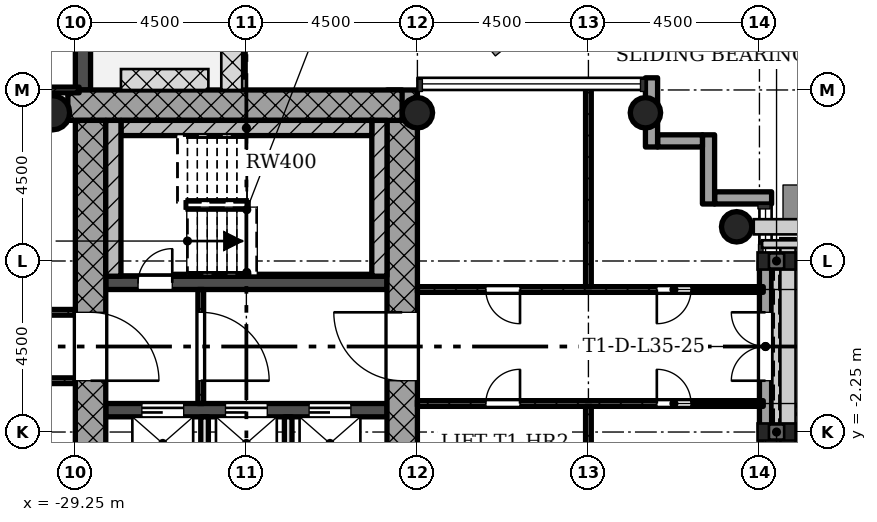
"""IFC4 building model, lengths in metres.
Left out: names, types, materials, properties, quantities, classifications, styles, units other than length and angle.
Written with IfcOpenShell. Run it as: python <this file> out.ifc"""

import sys

from ifc_helpers import new_model, si_unit, direction, frame, frame_2d, origin, origin_2d, place, context, subcontext, project, spatial, rectangle, hollow_circle, extrude, element, fill, save


model = new_model("IFC4")
c1 = context("Model", 3, precision=1e-05, world=origin(), true_north=direction((0.0, 1.0)))
c2 = subcontext(c1, "Body", "Model", "MODEL_VIEW")
j1 = project(units=[si_unit("LENGTHUNIT", "METRE"), si_unit("PLANEANGLEUNIT", "RADIAN")], contexts=[c1])
p1 = place(None, origin())
s1 = spatial("IfcSite", under=j1, at=p1, CompositionType="ELEMENT")
p2 = place(p1, origin())
s2 = spatial("IfcBuilding", under=s1, at=p2, CompositionType="ELEMENT")
p3 = place(p2, frame((0.0, 0.0, 128.7)))
s3 = spatial("IfcBuildingStorey", under=s2, at=p3, CompositionType="ELEMENT", Elevation=128.7)
p4 = place(p3, frame((-20.65, -5.95, 0.0), z_axis=(0.0, 0.0, 1.0), x_axis=(0.0, 1.0, 0.0)))
e1 = element("IfcWall", 1, at=p4, inside=s3, PredefinedType="SHEAR", context=c2, shape_type="SweptSolid", body=[
    extrude(rectangle(XDim=12.7, YDim=0.8, at=frame_2d((6.35, 0.0))), origin(), (0.0, 0.0, 1.0), 5.0),
])
p5 = place(p4, frame((5.05, 0.0, 0.0)))
e2 = element("IfcOpeningElement", 2, at=p5, cuts=e1, PredefinedType="OPENING", context=c2, shape_type="SweptSolid", body=[
    extrude(rectangle(XDim=1.8, YDim=2.1, at=frame_2d((0.9, 1.05))), frame((0.0, 0.41, 0.0), z_axis=(0.0, -1.0, 0.0), x_axis=(1.0, 0.0, 0.0)), (0.0, 0.0, 1.0), 0.82),
])
p6 = place(p3, frame((-20.652, 6.35, 0.0), z_axis=(0.0, 0.0, 1.0), x_axis=(-1.0, 0.0, 0.0)))
e3 = element("IfcWall", 3, at=p6, inside=s3, PredefinedType="SHEAR", context=c2, shape_type="SweptSolid", body=[
    extrude(rectangle(XDim=8.796, YDim=0.8, at=frame_2d((4.398, 0.0))), origin(), (0.0, 0.0, 1.0), 5.0),
])
p7 = place(p3, frame((-28.85, 5.95, 0.0), z_axis=(0.0, 0.0, 1.0), x_axis=(0.0, -1.0, 0.0)))
e4 = element("IfcWall", 4, at=p7, inside=s3, PredefinedType="SHEAR", context=c2, shape_type="SweptSolid", body=[
    extrude(rectangle(XDim=12.7, YDim=0.8, at=frame_2d((6.35, 0.0))), origin(), (0.0, 0.0, 1.0), 5.0),
])
p8 = place(p7, frame((5.05, 0.0, 0.0)))
e5 = element("IfcOpeningElement", 5, at=p8, cuts=e4, PredefinedType="OPENING", context=c2, shape_type="SweptSolid", body=[
    extrude(rectangle(XDim=1.8, YDim=2.1, at=frame_2d((0.9, 1.05))), frame((0.0, 0.41, 0.0), z_axis=(0.0, -1.0, 0.0), x_axis=(1.0, 0.0, 0.0)), (0.0, 0.0, 1.0), 0.82),
])
p9 = place(p3, frame((-28.45, -1.675, 0.0), z_axis=(0.0, 0.0, 1.0), x_axis=(1.0, 0.0, 0.0)))
e6 = element("IfcWall", 6, at=p9, inside=s3, PredefinedType="SHEAR", context=c2, shape_type="SweptSolid", body=[
    extrude(rectangle(XDim=7.4, YDim=0.35, at=frame_2d((3.7, 0.0))), origin(), (0.0, 0.0, 1.0), 5.0),
])
p10 = place(p9, frame((0.95, 0.0, 0.0)))
e7 = element("IfcOpeningElement", 7, at=p10, cuts=e6, PredefinedType="OPENING", context=c2, shape_type="SweptSolid", body=[
    extrude(rectangle(XDim=1.1, YDim=2.1, at=frame_2d((0.55, 1.05))), frame((0.0, 0.185, 0.0), z_axis=(0.0, -1.0, 0.0), x_axis=(1.0, 0.0, 0.0)), (0.0, 0.0, 1.0), 0.37),
])
p11 = place(p9, frame((3.15, 0.0, 0.0)))
e8 = element("IfcOpeningElement", 8, at=p11, cuts=e6, PredefinedType="OPENING", context=c2, shape_type="SweptSolid", body=[
    extrude(rectangle(XDim=1.1, YDim=2.1, at=frame_2d((0.55, 1.05))), frame((0.0, 0.185, 0.0), z_axis=(0.0, -1.0, 0.0), x_axis=(1.0, 0.0, 0.0)), (0.0, 0.0, 1.0), 0.37),
])
p12 = place(p9, frame((5.35, 0.0, 0.0)))
e9 = element("IfcOpeningElement", 9, at=p12, cuts=e6, PredefinedType="OPENING", context=c2, shape_type="SweptSolid", body=[
    extrude(rectangle(XDim=1.1, YDim=2.1, at=frame_2d((0.55, 1.05))), frame((0.0, 0.185, 0.0), z_axis=(0.0, -1.0, 0.0), x_axis=(1.0, 0.0, 0.0)), (0.0, 0.0, 1.0), 0.37),
])
p13 = place(p3, frame((-28.45, 1.675, 0.0), z_axis=(0.0, 0.0, 1.0), x_axis=(1.0, 0.0, 0.0)))
e10 = element("IfcWall", 10, at=p13, inside=s3, PredefinedType="SHEAR", context=c2, shape_type="SweptSolid", body=[
    extrude(rectangle(XDim=7.4, YDim=0.35, at=frame_2d((3.7, 0.0))), origin(), (0.0, 0.0, 1.0), 5.0),
])
p14 = place(p13, frame((0.85, 0.0, 0.0)))
e11 = element("IfcOpeningElement", 11, at=p14, cuts=e10, PredefinedType="OPENING", context=c2, shape_type="SweptSolid", body=[
    extrude(rectangle(XDim=0.9, YDim=2.1, at=frame_2d((0.45, 1.05))), frame((0.0, 0.185, 0.0), z_axis=(0.0, -1.0, 0.0), x_axis=(1.0, 0.0, 0.0)), (0.0, 0.0, 1.0), 0.37),
])
for number, where, z_axis, x_axis in (
    (12, (-20.25, 6.15, 0.0), (0.0, 0.0, 1.0), (1.0, 0.0, 0.0)),
    (13, (-14.25, 6.15, 0.0), (0.0, 0.0, 1.0), (1.0, 0.0, 0.0)),
    (14, (-11.85, 3.15, 0.0), (0.0, 0.0, 1.0), (1.0, 0.0, 0.0)),
):
    element("IfcColumn", number, at=place(p3, frame(where, z_axis=z_axis, x_axis=x_axis)), inside=s3, PredefinedType="COLUMN", context=c2, shape_type="SweptSolid", body=[
        extrude(hollow_circle(Radius=0.4, WallThickness=0.028, at=origin_2d()), origin(), (0.0, 0.0, 1.0), 5.0),
    ])
p15 = place(p3, frame((-29.85, 6.15, 0.0), z_axis=(0.0, 0.0, 1.0), x_axis=(1.0, 0.0, 0.0)))
e15 = element("IfcColumn", 15, at=p15, inside=s3, PredefinedType="COLUMN", context=c2, shape_type="SweptSolid", body=[
    extrude(hollow_circle(Radius=0.45, WallThickness=0.032, at=origin_2d()), origin(), (0.0, 0.0, 1.0), 5.0),
])
p16 = place(p3, frame((-11.09, -2.25, 0.0), z_axis=(0.0, 0.0, 1.0), x_axis=(0.0, 1.0, 0.0)))
e16 = element("IfcWall", 16, at=p16, inside=s3, PredefinedType="STANDARD", context=c2, shape_type="SweptSolid", body=[
    extrude(rectangle(XDim=4.5, YDim=0.32, at=frame_2d((2.25, 0.0))), origin(), (0.0, 0.0, 1.0), 4.7),
])
p17 = place(p16, frame((1.35, 0.0, 0.0)))
e17 = element("IfcOpeningElement", 17, at=p17, cuts=e16, PredefinedType="OPENING", context=c2, shape_type="SweptSolid", body=[
    extrude(rectangle(XDim=1.8, YDim=2.1, at=frame_2d((0.9, 1.05))), frame((0.0, 0.17, 0.0), z_axis=(0.0, -1.0, 0.0), x_axis=(1.0, 0.0, 0.0)), (0.0, 0.0, 1.0), 0.34),
])
p18 = place(p3, frame((-10.93, 3.91, -0.3), z_axis=(0.0, 0.0, 1.0), x_axis=(-1.0, 0.0, 0.0)))
e18 = element("IfcWall", 18, at=p18, inside=s3, PredefinedType="STANDARD", context=c2, shape_type="SweptSolid", body=[
    extrude(rectangle(XDim=1.5, YDim=0.32, at=frame_2d((0.75, 0.0))), origin(), (0.0, 0.0, 1.0), 5.0),
])
p19 = place(p3, frame((-12.59, 3.75, -0.3), z_axis=(0.0, 0.0, 1.0), x_axis=(0.0, 1.0, 0.0)))
e19 = element("IfcWall", 19, at=p19, inside=s3, PredefinedType="STANDARD", context=c2, shape_type="SweptSolid", body=[
    extrude(rectangle(XDim=1.82, YDim=0.32, at=frame_2d((0.91, 0.0))), origin(), (0.0, 0.0, 1.0), 5.0),
])
p20 = place(p3, frame((-12.75, 5.41, -0.3), z_axis=(0.0, 0.0, 1.0), x_axis=(-1.0, 0.0, 0.0)))
e20 = element("IfcWall", 20, at=p20, inside=s3, PredefinedType="STANDARD", context=c2, shape_type="SweptSolid", body=[
    extrude(rectangle(XDim=1.18, YDim=0.32, at=frame_2d((0.59, 0.0))), origin(), (0.0, 0.0, 1.0), 5.0),
])
p21 = place(p3, frame((-14.09, 5.25, -0.3), z_axis=(0.0, 0.0, 1.0), x_axis=(0.0, 1.0, 0.0)))
e21 = element("IfcWall", 21, at=p21, inside=s3, PredefinedType="STANDARD", context=c2, shape_type="SweptSolid", body=[
    extrude(rectangle(XDim=1.82, YDim=0.32, at=frame_2d((0.91, 0.0))), origin(), (0.0, 0.0, 1.0), 5.0),
])
p22 = place(p3, frame((-29.05, 6.75, -0.02), z_axis=(0.0, 0.0, 1.0), x_axis=(0.0, 1.0, 0.0)))
e22 = element("IfcWall", 22, at=p22, inside=s3, PredefinedType="STANDARD", context=c2, shape_type="SweptSolid", body=[
    extrude(rectangle(XDim=4.5, YDim=0.4, at=frame_2d((2.25, 0.0))), origin(), (0.0, 0.0, 1.0), 4.72),
])
p23 = place(p22, frame((1.35, 0.0, 0.02)))
e23 = element("IfcOpeningElement", 23, at=p23, cuts=e22, PredefinedType="OPENING", context=c2, shape_type="SweptSolid", body=[
    extrude(rectangle(XDim=1.8, YDim=2.1, at=frame_2d((0.9, 1.05))), frame((0.0, 0.21, 0.0), z_axis=(0.0, -1.0, 0.0), x_axis=(1.0, 0.0, 0.0)), (0.0, 0.0, 1.0), 0.42),
])
p24 = place(p3, frame((-25.95, -1.5, 0.0), z_axis=(0.0, 0.0, 1.0), x_axis=(0.0, 1.0, 0.0)))
e24 = element("IfcWall", 24, at=p24, inside=s3, PredefinedType="PARTITIONING", context=c2, shape_type="SweptSolid", body=[
    extrude(rectangle(XDim=3.0, YDim=0.15, at=frame_2d((1.5, 0.0))), origin(), (0.0, 0.0, 1.0), 4.58),
])
p25 = place(p24, frame((0.6, 0.0, 0.0)))
e25 = element("IfcOpeningElement", 25, at=p25, cuts=e24, PredefinedType="OPENING", context=c2, shape_type="SweptSolid", body=[
    extrude(rectangle(XDim=1.8, YDim=2.1, at=frame_2d((0.9, 1.05))), frame((0.0, 0.085, 0.0), z_axis=(0.0, -1.0, 0.0), x_axis=(1.0, 0.0, 0.0)), (0.0, 0.0, 1.0), 0.17),
])
for number, where, z_axis, x_axis in (
    (26, (-25.85, -5.95, 0.0), (0.0, 0.0, 1.0), (0.0, 1.0, 0.0)),
    (27, (-23.65, -5.95, 0.0), (0.0, 0.0, 1.0), (0.0, 1.0, 0.0)),
):
    element("IfcWall", number, at=place(p3, frame(where, z_axis=z_axis, x_axis=x_axis)), inside=s3, PredefinedType="SOLIDWALL", context=c2, shape_type="SweptSolid", body=[
        extrude(rectangle(XDim=4.1, YDim=0.2, at=frame_2d((2.05, 0.0))), origin(), (0.0, 0.0, 1.0), 4.58),
    ])
p26 = place(p3, frame((-35.1, 0.9, 0.0), z_axis=(0.0, 0.0, 1.0), x_axis=(1.0, 0.0, 0.0)))
e28 = element("IfcWall", 28, at=p26, inside=s3, PredefinedType="PARTITIONING", context=c2, shape_type="SweptSolid", body=[
    extrude(rectangle(XDim=5.85, YDim=0.15, at=frame_2d((2.925, 0.0))), origin(), (0.0, 0.0, 1.0), 4.58),
])
p27 = place(p26, frame((2.475, 0.0, 0.0)))
e29 = element("IfcOpeningElement", 29, at=p27, cuts=e28, PredefinedType="OPENING", context=c2, shape_type="SweptSolid", body=[
    extrude(rectangle(XDim=0.9, YDim=2.1, at=frame_2d((0.45, 1.05))), frame((0.0, 0.085, 0.0), z_axis=(0.0, -1.0, 0.0), x_axis=(1.0, 0.0, 0.0)), (0.0, 0.0, 1.0), 0.17),
])
p28 = place(p3, frame((-35.1, -0.9, 0.0), z_axis=(0.0, 0.0, 1.0), x_axis=(1.0, 0.0, 0.0)))
e30 = element("IfcWall", 30, at=p28, inside=s3, PredefinedType="PARTITIONING", context=c2, shape_type="SweptSolid", body=[
    extrude(rectangle(XDim=5.85, YDim=0.15, at=frame_2d((2.925, 0.0))), origin(), (0.0, 0.0, 1.0), 4.58),
])
p29 = place(p28, frame((2.475, 0.0, 0.0)))
e31 = element("IfcOpeningElement", 31, at=p29, cuts=e30, PredefinedType="OPENING", context=c2, shape_type="SweptSolid", body=[
    extrude(rectangle(XDim=0.9, YDim=2.1, at=frame_2d((0.45, 1.05))), frame((0.0, 0.085, 0.0), z_axis=(0.0, -1.0, 0.0), x_axis=(1.0, 0.0, 0.0)), (0.0, 0.0, 1.0), 0.17),
])
p30 = place(p3, frame((-20.25, 1.5, 0.0), z_axis=(0.0, 0.0, 1.0), x_axis=(1.0, 0.0, 0.0)))
e32 = element("IfcWall", 32, at=p30, inside=s3, PredefinedType="PARTITIONING", context=c2, shape_type="SweptSolid", body=[
    extrude(rectangle(XDim=9.1, YDim=0.15, at=frame_2d((4.55, 0.0))), origin(), (0.0, 0.0, 1.0), 4.58),
])
p31 = place(p30, frame((1.8, 0.0, 0.0)))
e33 = element("IfcOpeningElement", 33, at=p31, cuts=e32, PredefinedType="OPENING", context=c2, shape_type="SweptSolid", body=[
    extrude(rectangle(XDim=0.9, YDim=2.1, at=frame_2d((0.45, 1.05))), frame((0.0, 0.085, 0.0), z_axis=(0.0, -1.0, 0.0), x_axis=(1.0, 0.0, 0.0)), (0.0, 0.0, 1.0), 0.17),
])
p32 = place(p30, frame((6.3, 0.0, 0.0)))
e34 = element("IfcOpeningElement", 34, at=p32, cuts=e32, PredefinedType="OPENING", context=c2, shape_type="SweptSolid", body=[
    extrude(rectangle(XDim=0.9, YDim=2.1, at=frame_2d((0.45, 1.05))), frame((0.0, 0.085, 0.0), z_axis=(0.0, -1.0, 0.0), x_axis=(1.0, 0.0, 0.0)), (0.0, 0.0, 1.0), 0.17),
])
p33 = place(p3, frame((-15.75, 1.575, 0.0), z_axis=(0.0, 0.0, 1.0), x_axis=(0.0, 1.0, 0.0)))
e35 = element("IfcWall", 35, at=p33, inside=s3, PredefinedType="PARTITIONING", context=c2, shape_type="SweptSolid", body=[
    extrude(rectangle(XDim=5.275, YDim=0.15, at=frame_2d((2.638, 0.0))), origin(), (0.0, 0.0, 1.0), 4.58),
])
p34 = place(p3, frame((-20.25, -1.5, 0.0), z_axis=(0.0, 0.0, 1.0), x_axis=(1.0, 0.0, 0.0)))
e36 = element("IfcWall", 36, at=p34, inside=s3, PredefinedType="PARTITIONING", context=c2, shape_type="SweptSolid", body=[
    extrude(rectangle(XDim=9.1, YDim=0.15, at=frame_2d((4.55, 0.0))), origin(), (0.0, 0.0, 1.0), 4.58),
])
p35 = place(p34, frame((1.8, 0.0, 0.0)))
e37 = element("IfcOpeningElement", 37, at=p35, cuts=e36, PredefinedType="OPENING", context=c2, shape_type="SweptSolid", body=[
    extrude(rectangle(XDim=0.9, YDim=2.1, at=frame_2d((0.45, 1.05))), frame((0.0, 0.085, 0.0), z_axis=(0.0, -1.0, 0.0), x_axis=(1.0, 0.0, 0.0)), (0.0, 0.0, 1.0), 0.17),
])
p36 = place(p34, frame((6.3, 0.0, 0.0)))
e38 = element("IfcOpeningElement", 38, at=p36, cuts=e36, PredefinedType="OPENING", context=c2, shape_type="SweptSolid", body=[
    extrude(rectangle(XDim=0.9, YDim=2.1, at=frame_2d((0.45, 1.05))), frame((0.0, 0.085, 0.0), z_axis=(0.0, -1.0, 0.0), x_axis=(1.0, 0.0, 0.0)), (0.0, 0.0, 1.0), 0.17),
])
p37 = place(p3, frame((-15.75, -1.575, 0.0), z_axis=(0.0, 0.0, 1.0), x_axis=(0.0, -1.0, 0.0)))
e39 = element("IfcWall", 39, at=p37, inside=s3, PredefinedType="PARTITIONING", context=c2, shape_type="SweptSolid", body=[
    extrude(rectangle(XDim=5.275, YDim=0.15, at=frame_2d((2.638, 0.0))), origin(), (0.0, 0.0, 1.0), 4.58),
])
p38 = place(p3, frame((-42.85, 6.75, 0.0), z_axis=(0.0, 0.0, 1.0), x_axis=(1.0, 0.0, 0.0)))
e40 = element("IfcWall", 40, at=p38, inside=s3, PredefinedType="PARTITIONING", context=c2, shape_type="SweptSolid", body=[
    extrude(rectangle(XDim=13.7, YDim=0.15, at=frame_2d((6.85, 0.0))), origin(), (0.0, 0.0, 1.0), 4.58),
])
p39 = place(p38, frame((5.95, 0.0, 0.0)))
e41 = element("IfcOpeningElement", 41, at=p39, cuts=e40, PredefinedType="OPENING", context=c2, shape_type="SweptSolid", body=[
    extrude(rectangle(XDim=1.8, YDim=2.1, at=frame_2d((0.9, 1.05))), frame((0.0, 0.085, 0.0), z_axis=(0.0, -1.0, 0.0), x_axis=(1.0, 0.0, 0.0)), (0.0, 0.0, 1.0), 0.17),
])
p40 = place(p3, frame((-21.25, 1.85, 0.0), z_axis=(0.0, 0.0, 1.0), x_axis=(0.0, 1.0, 0.0)))
e42 = element("IfcWall", 42, at=p40, inside=s3, PredefinedType="SHEAR", context=c2, shape_type="SweptSolid", body=[
    extrude(rectangle(XDim=4.1, YDim=0.4, at=frame_2d((2.05, 0.0))), origin(), (0.0, 0.0, 1.0), 5.0),
])
p41 = place(p3, frame((-28.05, 5.75, 0.0), z_axis=(0.0, 0.0, 1.0), x_axis=(1.0, 0.0, 0.0)))
e43 = element("IfcWall", 43, at=p41, inside=s3, PredefinedType="SHEAR", context=c2, shape_type="SweptSolid", body=[
    extrude(rectangle(XDim=6.6, YDim=0.4, at=frame_2d((3.3, 0.0))), origin(), (0.0, 0.0, 1.0), 5.0),
])
p42 = place(p3, frame((-28.25, 1.85, 0.0), z_axis=(0.0, 0.0, 1.0), x_axis=(0.0, 1.0, 0.0)))
e44 = element("IfcWall", 44, at=p42, inside=s3, PredefinedType="SHEAR", context=c2, shape_type="SweptSolid", body=[
    extrude(rectangle(XDim=4.1, YDim=0.4, at=frame_2d((2.05, 0.0))), origin(), (0.0, 0.0, 1.0), 5.0),
])
p43 = place(p3, frame((-26.65, 1.875, 0.0), z_axis=(0.0, 0.0, 1.0), x_axis=(1.0, 0.0, 0.0)))
e45 = element("IfcWall", 45, at=p43, inside=s3, PredefinedType="SHEAR", context=c2, shape_type="SweptSolid", body=[
    extrude(rectangle(XDim=5.2, YDim=0.05, at=frame_2d((2.6, 0.0))), origin(), (0.0, 0.0, 1.0), 5.0),
])
p44 = place(p17, origin())
e46 = element("IfcDoor", 46, at=p44, inside=s3, OperationType="DOUBLE_DOOR_SINGLE_SWING", PredefinedType="DOOR", context=c2, shape_type="SweptSolid", body=[
    extrude(rectangle(XDim=1.8, YDim=2.1, at=frame_2d((0.9, 1.05))), frame((0.0, 0.025, 0.0), z_axis=(0.0, -1.0, 0.0), x_axis=(1.0, 0.0, 0.0)), (0.0, 0.0, 1.0), 0.05),
])
fill(e17, e46)
p45 = place(p25, origin())
e47 = element("IfcDoor", 47, at=p45, inside=s3, OperationType="SINGLE_SWING_LEFT", PredefinedType="DOOR", context=c2, shape_type="SweptSolid", body=[
    extrude(rectangle(XDim=1.8, YDim=2.1, at=frame_2d((0.9, 1.05))), frame((0.0, 0.025, 0.0), z_axis=(0.0, -1.0, 0.0), x_axis=(1.0, 0.0, 0.0)), (0.0, 0.0, 1.0), 0.05),
])
fill(e25, e47)
p46 = place(p31, origin())
e48 = element("IfcDoor", 48, at=p46, inside=s3, OperationType="SINGLE_SWING_RIGHT", PredefinedType="DOOR", context=c2, shape_type="SweptSolid", body=[
    extrude(rectangle(XDim=0.9, YDim=2.1, at=frame_2d((0.45, 1.05))), frame((0.0, 0.025, 0.0), z_axis=(0.0, -1.0, 0.0), x_axis=(1.0, 0.0, 0.0)), (0.0, 0.0, 1.0), 0.05),
])
fill(e33, e48)
p47 = place(p32, origin())
e49 = element("IfcDoor", 49, at=p47, inside=s3, OperationType="SINGLE_SWING_LEFT", PredefinedType="DOOR", context=c2, shape_type="SweptSolid", body=[
    extrude(rectangle(XDim=0.9, YDim=2.1, at=frame_2d((0.45, 1.05))), frame((0.0, 0.025, 0.0), z_axis=(0.0, -1.0, 0.0), x_axis=(1.0, 0.0, 0.0)), (0.0, 0.0, 1.0), 0.05),
])
fill(e34, e49)
p48 = place(p35, origin())
e50 = element("IfcDoor", 50, at=p48, inside=s3, OperationType="SINGLE_SWING_LEFT", PredefinedType="DOOR", context=c2, shape_type="SweptSolid", body=[
    extrude(rectangle(XDim=0.9, YDim=2.1, at=frame_2d((0.45, 1.05))), frame((0.0, 0.025, 0.0), z_axis=(0.0, -1.0, 0.0), x_axis=(1.0, 0.0, 0.0)), (0.0, 0.0, 1.0), 0.05),
])
fill(e37, e50)
p49 = place(p36, origin())
e51 = element("IfcDoor", 51, at=p49, inside=s3, OperationType="SINGLE_SWING_RIGHT", PredefinedType="DOOR", context=c2, shape_type="SweptSolid", body=[
    extrude(rectangle(XDim=0.9, YDim=2.1, at=frame_2d((0.45, 1.05))), frame((0.0, 0.025, 0.0), z_axis=(0.0, -1.0, 0.0), x_axis=(1.0, 0.0, 0.0)), (0.0, 0.0, 1.0), 0.05),
])
fill(e38, e51)
p50 = place(p14, origin())
e52 = element("IfcDoor", 52, at=p50, inside=s3, OperationType="SINGLE_SWING_LEFT", PredefinedType="DOOR", context=c2, shape_type="SweptSolid", body=[
    extrude(rectangle(XDim=0.9, YDim=2.1, at=frame_2d((0.45, 1.05))), frame((0.0, 0.025, 0.0), z_axis=(0.0, -1.0, 0.0), x_axis=(1.0, 0.0, 0.0)), (0.0, 0.0, 1.0), 0.05),
])
fill(e11, e52)
p51 = place(p10, origin())
e53 = element("IfcDoor", 53, at=p51, inside=s3, OperationType="SLIDING_TO_LEFT", PredefinedType="DOOR", context=c2, shape_type="SweptSolid", body=[
    extrude(rectangle(XDim=1.1, YDim=2.1, at=frame_2d((0.55, 1.05))), frame((0.0, 0.025, 0.0), z_axis=(0.0, -1.0, 0.0), x_axis=(1.0, 0.0, 0.0)), (0.0, 0.0, 1.0), 0.05),
])
fill(e7, e53)
p52 = place(p11, origin())
e54 = element("IfcDoor", 54, at=p52, inside=s3, OperationType="SLIDING_TO_LEFT", PredefinedType="DOOR", context=c2, shape_type="SweptSolid", body=[
    extrude(rectangle(XDim=1.1, YDim=2.1, at=frame_2d((0.55, 1.05))), frame((0.0, 0.025, 0.0), z_axis=(0.0, -1.0, 0.0), x_axis=(1.0, 0.0, 0.0)), (0.0, 0.0, 1.0), 0.05),
])
fill(e8, e54)
p53 = place(p12, origin())
e55 = element("IfcDoor", 55, at=p53, inside=s3, OperationType="SLIDING_TO_LEFT", PredefinedType="DOOR", context=c2, shape_type="SweptSolid", body=[
    extrude(rectangle(XDim=1.1, YDim=2.1, at=frame_2d((0.55, 1.05))), frame((0.0, 0.025, 0.0), z_axis=(0.0, -1.0, 0.0), x_axis=(1.0, 0.0, 0.0)), (0.0, 0.0, 1.0), 0.05),
])
fill(e9, e55)
p54 = place(p8, origin())
e56 = element("IfcDoor", 56, at=p54, inside=s3, OperationType="SINGLE_SWING_LEFT", PredefinedType="DOOR", context=c2, shape_type="SweptSolid", body=[
    extrude(rectangle(XDim=1.8, YDim=2.1, at=frame_2d((0.9, 1.05))), frame((0.0, 0.025, 0.0), z_axis=(0.0, -1.0, 0.0), x_axis=(1.0, 0.0, 0.0)), (0.0, 0.0, 1.0), 0.05),
])
fill(e5, e56)
p55 = place(p5, origin())
e57 = element("IfcDoor", 57, at=p55, inside=s3, OperationType="SINGLE_SWING_LEFT", PredefinedType="DOOR", context=c2, shape_type="SweptSolid", body=[
    extrude(rectangle(XDim=1.8, YDim=2.1, at=frame_2d((0.9, 1.05))), frame((0.0, 0.025, 0.0), z_axis=(0.0, -1.0, 0.0), x_axis=(1.0, 0.0, 0.0)), (0.0, 0.0, 1.0), 0.05),
])
fill(e2, e57)
save(model, sys.argv[1])
